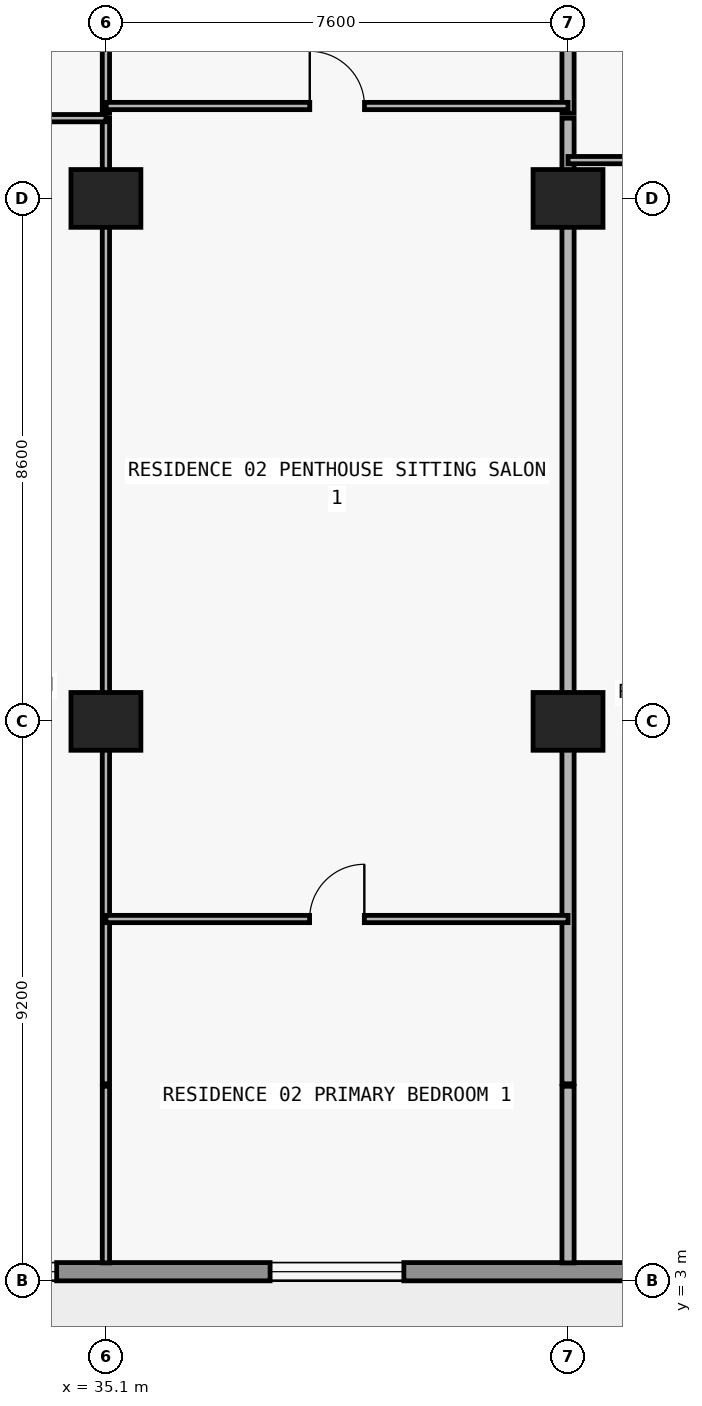
"""IFC4 building model, lengths in metres.
Left out: names, types, materials, properties, quantities, classifications, styles, units other than length and angle.
Written with IfcOpenShell. Run it as: python <this file> out.ifc"""

import sys

from ifc_helpers import new_model, si_unit, direction, frame, frame_2d, origin, origin_2d, place, context, subcontext, project, spatial, rectangle, extrude, element, fill, save


model = new_model("IFC4")
c1 = context("Model", 3, precision=1e-05, world=origin(), true_north=direction((0.0, 1.0)))
c2 = subcontext(c1, "Body", "Model", "MODEL_VIEW")
j1 = project(units=[si_unit("LENGTHUNIT", "METRE"), si_unit("PLANEANGLEUNIT", "RADIAN")], contexts=[c1])
p1 = place(None, origin())
s1 = spatial("IfcSite", under=j1, at=p1, CompositionType="ELEMENT")
p2 = place(p1, origin())
s2 = spatial("IfcBuilding", under=s1, at=p2, CompositionType="ELEMENT")
p3 = place(p2, frame((0.0, 0.0, 56.4)))
s3 = spatial("IfcBuildingStorey", under=s2, at=p3, CompositionType="ELEMENT", Elevation=56.4)
for number, where, z_axis, x_axis in (
    (1, (35.1, 12.2, 0.0), (0.0, 0.0, 1.0), (1.0, 0.0, 0.0)),
    (2, (42.7, 12.2, 0.0), (0.0, 0.0, 1.0), (1.0, 0.0, 0.0)),
    (3, (35.1, 20.8, 0.0), (0.0, 0.0, 1.0), (1.0, 0.0, 0.0)),
    (4, (42.7, 20.8, 0.0), (0.0, 0.0, 1.0), (1.0, 0.0, 0.0)),
):
    element("IfcColumn", number, at=place(p3, frame(where, z_axis=z_axis, x_axis=x_axis)), inside=s3, PredefinedType="COLUMN", context=c2, shape_type="SweptSolid", body=[
        extrude(rectangle(XDim=1.15, YDim=0.95, at=origin_2d()), origin(), (0.0, 0.0, 1.0), 3.05),
    ])
p4 = place(p3, frame((72.7, 3.15, 0.0), z_axis=(0.0, 0.0, 1.0), x_axis=(-1.0, 0.0, 0.0)))
e5 = element("IfcWall", 5, at=p4, inside=s3, PredefinedType="STANDARD", context=c2, shape_type="SweptSolid", body=[
    extrude(rectangle(XDim=67.6, YDim=0.3, at=frame_2d((33.8, 0.0))), origin(), (0.0, 0.0, 1.0), 3.05),
])
p5 = place(p4, frame((59.89, 0.0, 0.0)))
e6 = element("IfcOpeningElement", 6, at=p5, cuts=e5, PredefinedType="OPENING", context=c2, shape_type="SweptSolid", body=[
    extrude(rectangle(XDim=2.0, YDim=2.3, at=frame_2d((1.0, 1.15))), frame((0.0, 0.16, 0.0), z_axis=(0.0, -1.0, 0.0), x_axis=(1.0, 0.0, 0.0)), (0.0, 0.0, 1.0), 0.32),
])
p6 = place(p4, frame((55.21, 0.0, 0.65)))
e7 = element("IfcOpeningElement", 7, at=p6, cuts=e5, PredefinedType="OPENING", context=c2, shape_type="SweptSolid", body=[
    extrude(rectangle(XDim=2.6, YDim=1.85, at=frame_2d((1.3, 0.925))), frame((0.0, 0.16, 0.0), z_axis=(0.0, -1.0, 0.0), x_axis=(1.0, 0.0, 0.0)), (0.0, 0.0, 1.0), 0.32),
])
p7 = place(p4, frame((49.1, 0.0, 0.85)))
e8 = element("IfcOpeningElement", 8, at=p7, cuts=e5, PredefinedType="OPENING", context=c2, shape_type="SweptSolid", body=[
    extrude(rectangle(XDim=2.2, YDim=1.55, at=frame_2d((1.1, 0.775))), frame((0.0, 0.16, 0.0), z_axis=(0.0, -1.0, 0.0), x_axis=(1.0, 0.0, 0.0)), (0.0, 0.0, 1.0), 0.32),
])
p8 = place(p4, frame((43.09, 0.0, 0.0)))
e9 = element("IfcOpeningElement", 9, at=p8, cuts=e5, PredefinedType="OPENING", context=c2, shape_type="SweptSolid", body=[
    extrude(rectangle(XDim=2.0, YDim=2.3, at=frame_2d((1.0, 1.15))), frame((0.0, 0.16, 0.0), z_axis=(0.0, -1.0, 0.0), x_axis=(1.0, 0.0, 0.0)), (0.0, 0.0, 1.0), 0.32),
])
p9 = place(p4, frame((38.41, 0.0, 0.65)))
e10 = element("IfcOpeningElement", 10, at=p9, cuts=e5, PredefinedType="OPENING", context=c2, shape_type="SweptSolid", body=[
    extrude(rectangle(XDim=2.6, YDim=1.85, at=frame_2d((1.3, 0.925))), frame((0.0, 0.16, 0.0), z_axis=(0.0, -1.0, 0.0), x_axis=(1.0, 0.0, 0.0)), (0.0, 0.0, 1.0), 0.32),
])
p10 = place(p4, frame((32.7, 0.0, 0.85)))
e11 = element("IfcOpeningElement", 11, at=p10, cuts=e5, PredefinedType="OPENING", context=c2, shape_type="SweptSolid", body=[
    extrude(rectangle(XDim=2.2, YDim=1.55, at=frame_2d((1.1, 0.775))), frame((0.0, 0.16, 0.0), z_axis=(0.0, -1.0, 0.0), x_axis=(1.0, 0.0, 0.0)), (0.0, 0.0, 1.0), 0.32),
])
p11 = place(p4, frame((27.026, 0.0, 0.0)))
e12 = element("IfcOpeningElement", 12, at=p11, cuts=e5, PredefinedType="OPENING", context=c2, shape_type="SweptSolid", body=[
    extrude(rectangle(XDim=2.0, YDim=2.3, at=frame_2d((1.0, 1.15))), frame((0.0, 0.16, 0.0), z_axis=(0.0, -1.0, 0.0), x_axis=(1.0, 0.0, 0.0)), (0.0, 0.0, 1.0), 0.32),
])
p12 = place(p4, frame((22.726, 0.0, 0.85)))
e13 = element("IfcOpeningElement", 13, at=p12, cuts=e5, PredefinedType="OPENING", context=c2, shape_type="SweptSolid", body=[
    extrude(rectangle(XDim=2.2, YDim=1.55, at=frame_2d((1.1, 0.775))), frame((0.0, 0.16, 0.0), z_axis=(0.0, -1.0, 0.0), x_axis=(1.0, 0.0, 0.0)), (0.0, 0.0, 1.0), 0.32),
])
p13 = place(p4, frame((18.29, 0.0, 0.0)))
e14 = element("IfcOpeningElement", 14, at=p13, cuts=e5, PredefinedType="OPENING", context=c2, shape_type="SweptSolid", body=[
    extrude(rectangle(XDim=2.0, YDim=2.3, at=frame_2d((1.0, 1.15))), frame((0.0, 0.16, 0.0), z_axis=(0.0, -1.0, 0.0), x_axis=(1.0, 0.0, 0.0)), (0.0, 0.0, 1.0), 0.32),
])
p14 = place(p4, frame((14.19, 0.0, 0.85)))
e15 = element("IfcOpeningElement", 15, at=p14, cuts=e5, PredefinedType="OPENING", context=c2, shape_type="SweptSolid", body=[
    extrude(rectangle(XDim=1.8, YDim=1.55, at=frame_2d((0.9, 0.775))), frame((0.0, 0.16, 0.0), z_axis=(0.0, -1.0, 0.0), x_axis=(1.0, 0.0, 0.0)), (0.0, 0.0, 1.0), 0.32),
])
p15 = place(p4, frame((10.226, 0.0, 0.0)))
e16 = element("IfcOpeningElement", 16, at=p15, cuts=e5, PredefinedType="OPENING", context=c2, shape_type="SweptSolid", body=[
    extrude(rectangle(XDim=2.0, YDim=2.3, at=frame_2d((1.0, 1.15))), frame((0.0, 0.16, 0.0), z_axis=(0.0, -1.0, 0.0), x_axis=(1.0, 0.0, 0.0)), (0.0, 0.0, 1.0), 0.32),
])
p16 = place(p4, frame((5.926, 0.0, 0.85)))
e17 = element("IfcOpeningElement", 17, at=p16, cuts=e5, PredefinedType="OPENING", context=c2, shape_type="SweptSolid", body=[
    extrude(rectangle(XDim=2.2, YDim=1.55, at=frame_2d((1.1, 0.775))), frame((0.0, 0.16, 0.0), z_axis=(0.0, -1.0, 0.0), x_axis=(1.0, 0.0, 0.0)), (0.0, 0.0, 1.0), 0.32),
])
p17 = place(p3, frame((35.1, 3.295, 0.0), z_axis=(0.0, 0.0, 1.0), x_axis=(0.0, 1.0, 0.0)))
e18 = element("IfcWall", 18, at=p17, inside=s3, PredefinedType="PARTITIONING", context=c2, shape_type="SweptSolid", body=[
    extrude(rectangle(XDim=2.905, YDim=0.12, at=frame_2d((1.453, 0.0))), origin(), (0.0, 0.0, 1.0), 3.05),
])
p18 = place(p3, frame((35.1, 6.24, 0.0), z_axis=(0.0, 0.0, 1.0), x_axis=(0.0, 1.0, 0.0)))
e19 = element("IfcWall", 19, at=p18, inside=s3, PredefinedType="PARTITIONING", context=c2, shape_type="SweptSolid", body=[
    extrude(rectangle(XDim=15.88, YDim=0.12, at=frame_2d((7.94, 0.0))), origin(), (0.0, 0.0, 1.0), 2.11),
])
p19 = place(p3, frame((35.1, 22.2, 0.0), z_axis=(0.0, 0.0, 1.0), x_axis=(0.0, 1.0, 0.0)))
e20 = element("IfcWall", 20, at=p19, inside=s3, PredefinedType="PARTITIONING", context=c2, shape_type="SweptSolid", body=[
    extrude(rectangle(XDim=4.38, YDim=0.12, at=frame_2d((2.19, 0.0))), origin(), (0.0, 0.0, 1.0), 2.11),
])
p20 = place(p19, frame((1.8, 0.0, 0.0)))
e21 = element("IfcOpeningElement", 21, at=p20, cuts=e20, PredefinedType="OPENING", context=c2, shape_type="SweptSolid", body=[
    extrude(rectangle(XDim=0.9, YDim=2.06, at=frame_2d((0.45, 1.03))), frame((0.0, 0.07, 0.0), z_axis=(0.0, -1.0, 0.0), x_axis=(1.0, 0.0, 0.0)), (0.0, 0.0, 1.0), 0.14),
])
p21 = place(p3, frame((42.7, 3.295, 0.0), z_axis=(0.0, 0.0, 1.0), x_axis=(0.0, 1.0, 0.0)))
e22 = element("IfcWall", 22, at=p21, inside=s3, PredefinedType="PARTITIONING", context=c2, shape_type="SweptSolid", body=[
    extrude(rectangle(XDim=2.905, YDim=0.2, at=frame_2d((1.453, 0.0))), origin(), (0.0, 0.0, 1.0), 3.05),
])
p22 = place(p3, frame((42.7, 6.24, 0.0), z_axis=(0.0, 0.0, 1.0), x_axis=(0.0, 1.0, 0.0)))
e23 = element("IfcWall", 23, at=p22, inside=s3, PredefinedType="PARTITIONING", context=c2, shape_type="SweptSolid", body=[
    extrude(rectangle(XDim=15.88, YDim=0.2, at=frame_2d((7.94, 0.0))), origin(), (0.0, 0.0, 1.0), 2.11),
])
p23 = place(p3, frame((42.7, 22.2, 0.0), z_axis=(0.0, 0.0, 1.0), x_axis=(0.0, 1.0, 0.0)))
e24 = element("IfcWall", 24, at=p23, inside=s3, PredefinedType="PARTITIONING", context=c2, shape_type="SweptSolid", body=[
    extrude(rectangle(XDim=4.38, YDim=0.2, at=frame_2d((2.19, 0.0))), origin(), (0.0, 0.0, 1.0), 2.11),
])
p24 = place(p3, frame((35.1, 8.95, 0.0), z_axis=(0.0, 0.0, 1.0), x_axis=(1.0, 0.0, 0.0)))
e25 = element("IfcWall", 25, at=p24, inside=s3, PredefinedType="PARTITIONING", context=c2, shape_type="SweptSolid", body=[
    extrude(rectangle(XDim=7.6, YDim=0.12, at=frame_2d((3.8, 0.0))), origin(), (0.0, 0.0, 1.0), 3.05),
])
p25 = place(p24, frame((3.35, 0.0, 0.0)))
e26 = element("IfcOpeningElement", 26, at=p25, cuts=e25, PredefinedType="OPENING", context=c2, shape_type="SweptSolid", body=[
    extrude(rectangle(XDim=0.9, YDim=2.15, at=frame_2d((0.45, 1.075))), frame((0.0, 0.07, 0.0), z_axis=(0.0, -1.0, 0.0), x_axis=(1.0, 0.0, 0.0)), (0.0, 0.0, 1.0), 0.14),
])
p26 = place(p3, frame((42.7, 21.43, 0.0), z_axis=(0.0, 0.0, 1.0), x_axis=(1.0, 0.0, 0.0)))
e27 = element("IfcWall", 27, at=p26, inside=s3, PredefinedType="PARTITIONING", context=c2, shape_type="SweptSolid", body=[
    extrude(rectangle(XDim=8.13, YDim=0.12, at=frame_2d((4.065, 0.0))), origin(), (0.0, 0.0, 1.0), 3.05),
])
p27 = place(p26, frame((1.524, 0.0, 0.0)))
e28 = element("IfcOpeningElement", 28, at=p27, cuts=e27, PredefinedType="OPENING", context=c2, shape_type="SweptSolid", body=[
    extrude(rectangle(XDim=0.9, YDim=2.15, at=frame_2d((0.45, 1.075))), frame((0.0, 0.07, 0.0), z_axis=(0.0, -1.0, 0.0), x_axis=(1.0, 0.0, 0.0)), (0.0, 0.0, 1.0), 0.14),
])
p28 = place(p26, frame((5.758, 0.0, 0.0)))
e29 = element("IfcOpeningElement", 29, at=p28, cuts=e27, PredefinedType="OPENING", context=c2, shape_type="SweptSolid", body=[
    extrude(rectangle(XDim=0.9, YDim=2.15, at=frame_2d((0.45, 1.075))), frame((0.0, 0.07, 0.0), z_axis=(0.0, -1.0, 0.0), x_axis=(1.0, 0.0, 0.0)), (0.0, 0.0, 1.0), 0.14),
])
p29 = place(p3, frame((26.97, 22.12, 0.0), z_axis=(0.0, 0.0, 1.0), x_axis=(1.0, 0.0, 0.0)))
e30 = element("IfcWall", 30, at=p29, inside=s3, PredefinedType="PARTITIONING", context=c2, shape_type="SweptSolid", body=[
    extrude(rectangle(XDim=8.13, YDim=0.12, at=frame_2d((4.065, 0.0))), origin(), (0.0, 0.0, 1.0), 3.05),
])
p30 = place(p29, frame((1.179, 0.0, 0.0)))
e31 = element("IfcOpeningElement", 31, at=p30, cuts=e30, PredefinedType="OPENING", context=c2, shape_type="SweptSolid", body=[
    extrude(rectangle(XDim=0.9, YDim=2.15, at=frame_2d((0.45, 1.075))), frame((0.0, 0.07, 0.0), z_axis=(0.0, -1.0, 0.0), x_axis=(1.0, 0.0, 0.0)), (0.0, 0.0, 1.0), 0.14),
])
p31 = place(p3, frame((35.105, 22.32, 0.0), z_axis=(0.0, 0.0, 1.0), x_axis=(1.0, 0.0, 0.0)))
e32 = element("IfcWall", 32, at=p31, inside=s3, PredefinedType="PARTITIONING", context=c2, shape_type="SweptSolid", body=[
    extrude(rectangle(XDim=7.595, YDim=0.12, at=frame_2d((3.797, 0.0))), origin(), (0.0, 0.0, 1.0), 3.05),
])
p32 = place(p31, frame((3.347, 0.0, 0.0)))
e33 = element("IfcOpeningElement", 33, at=p32, cuts=e32, PredefinedType="OPENING", context=c2, shape_type="SweptSolid", body=[
    extrude(rectangle(XDim=0.9, YDim=2.15, at=frame_2d((0.45, 1.075))), frame((0.0, 0.07, 0.0), z_axis=(0.0, -1.0, 0.0), x_axis=(1.0, 0.0, 0.0)), (0.0, 0.0, 1.0), 0.14),
])
p33 = place(p9, origin())
e34 = element("IfcWindow", 34, at=p33, inside=s3, PartitioningType="SINGLE_PANEL", PredefinedType="WINDOW", context=c2, shape_type="SweptSolid", body=[
    extrude(rectangle(XDim=2.6, YDim=1.85, at=frame_2d((1.3, 0.925))), frame((0.0, 0.03, 0.0), z_axis=(0.0, -1.0, 0.0), x_axis=(1.0, 0.0, 0.0)), (0.0, 0.0, 1.0), 0.06),
])
fill(e10, e34)
p34 = place(p10, origin())
e35 = element("IfcWindow", 35, at=p34, inside=s3, PartitioningType="SINGLE_PANEL", PredefinedType="WINDOW", context=c2, shape_type="SweptSolid", body=[
    extrude(rectangle(XDim=2.2, YDim=1.55, at=frame_2d((1.1, 0.775))), frame((0.0, 0.03, 0.0), z_axis=(0.0, -1.0, 0.0), x_axis=(1.0, 0.0, 0.0)), (0.0, 0.0, 1.0), 0.06),
])
fill(e11, e35)
p35 = place(p32, origin())
e36 = element("IfcDoor", 36, at=p35, inside=s3, OperationType="SINGLE_SWING_LEFT", PredefinedType="DOOR", context=c2, shape_type="SweptSolid", body=[
    extrude(rectangle(XDim=0.9, YDim=2.15, at=frame_2d((0.45, 1.075))), frame((0.0, 0.025, 0.0), z_axis=(0.0, -1.0, 0.0), x_axis=(1.0, 0.0, 0.0)), (0.0, 0.0, 1.0), 0.05),
])
fill(e33, e36)
p36 = place(p25, origin())
e37 = element("IfcDoor", 37, at=p36, inside=s3, OperationType="SINGLE_SWING_RIGHT", PredefinedType="DOOR", context=c2, shape_type="SweptSolid", body=[
    extrude(rectangle(XDim=0.9, YDim=2.15, at=frame_2d((0.45, 1.075))), frame((0.0, 0.025, 0.0), z_axis=(0.0, -1.0, 0.0), x_axis=(1.0, 0.0, 0.0)), (0.0, 0.0, 1.0), 0.05),
])
fill(e26, e37)
save(model, sys.argv[1])
